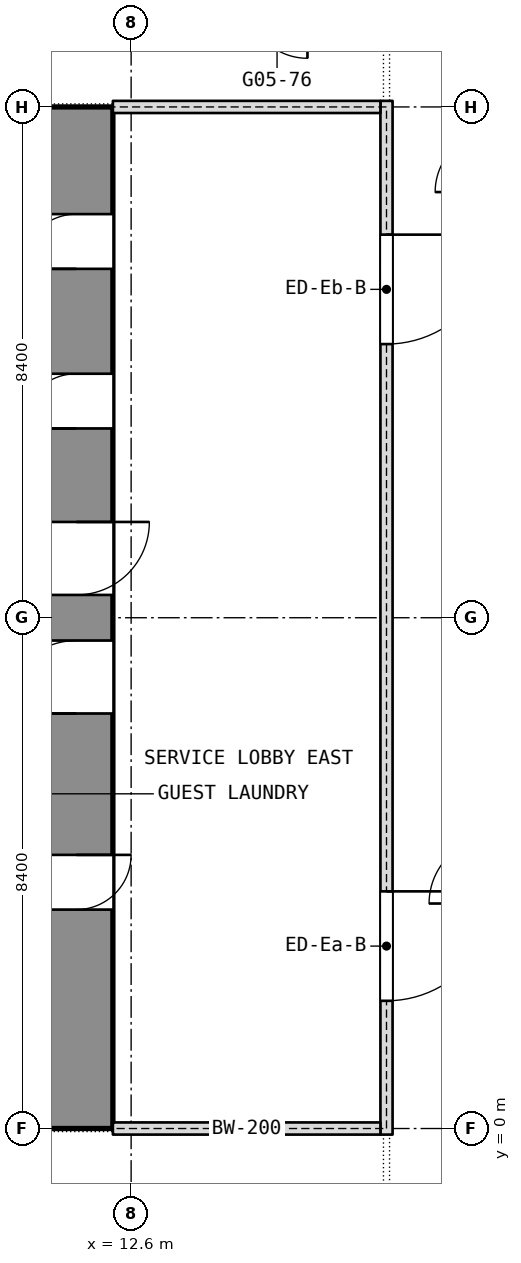
"""IFC4 building model, lengths in metres.
Left out: names, types, materials, properties, quantities, classifications, styles, units other than length and angle.
Written with IfcOpenShell. Run it as: python <this file> out.ifc"""

import sys

from ifc_helpers import new_model, si_unit, direction, frame, frame_2d, origin, place, context, subcontext, project, spatial, rectangle, extrude, element, fill, save


model = new_model("IFC4")
c1 = context("Model", 3, precision=1e-05, world=origin(), true_north=direction((0.0, 1.0)))
c2 = subcontext(c1, "Body", "Model", "MODEL_VIEW")
j1 = project(units=[si_unit("LENGTHUNIT", "METRE"), si_unit("PLANEANGLEUNIT", "RADIAN")], contexts=[c1])
p1 = place(None, origin())
s1 = spatial("IfcSite", under=j1, at=p1, CompositionType="ELEMENT")
p2 = place(p1, origin())
s2 = spatial("IfcBuilding", under=s1, at=p2, CompositionType="ELEMENT")
p3 = place(p2, frame((0.0, 0.0, 68.9)))
s3 = spatial("IfcBuildingStorey", under=s2, at=p3, CompositionType="ELEMENT", Elevation=68.9)
p4 = place(p3, frame((11.7, 0.0, 0.0), z_axis=(0.0, 0.0, 1.0), x_axis=(0.0, 1.0, 0.0)))
e1 = element("IfcWall", 1, at=p4, inside=s3, PredefinedType="SHEAR", context=c2, shape_type="SweptSolid", body=[
    extrude(rectangle(XDim=16.8, YDim=1.2, at=frame_2d((8.4, 0.0))), origin(), (0.0, 0.0, 1.0), 3.6),
])
p5 = place(p4, frame((3.6, 0.0, 0.0)))
e2 = element("IfcOpeningElement", 2, at=p5, cuts=e1, PredefinedType="OPENING", context=c2, shape_type="SweptSolid", body=[
    extrude(rectangle(XDim=0.9, YDim=2.1, at=frame_2d((0.45, 1.05))), frame((0.0, 0.6, 0.0), z_axis=(0.0, -1.0, 0.0), x_axis=(1.0, 0.0, 0.0)), (0.0, 0.0, 1.0), 1.2),
])
p6 = place(p4, frame((6.825, 0.0, 0.0)))
e3 = element("IfcOpeningElement", 3, at=p6, cuts=e1, PredefinedType="OPENING", context=c2, shape_type="SweptSolid", body=[
    extrude(rectangle(XDim=1.2, YDim=2.1, at=frame_2d((0.6, 1.05))), frame((0.0, 0.6, 0.0), z_axis=(0.0, -1.0, 0.0), x_axis=(1.0, 0.0, 0.0)), (0.0, 0.0, 1.0), 1.2),
])
p7 = place(p4, frame((14.137, 0.0, 0.0)))
e4 = element("IfcOpeningElement", 4, at=p7, cuts=e1, PredefinedType="OPENING", context=c2, shape_type="SweptSolid", body=[
    extrude(rectangle(XDim=0.9, YDim=2.1, at=frame_2d((0.45, 1.05))), frame((0.0, 0.6, 0.0), z_axis=(0.0, -1.0, 0.0), x_axis=(1.0, 0.0, 0.0)), (0.0, 0.0, 1.0), 1.2),
])
p8 = place(p4, frame((11.512, 0.0, 0.0)))
e5 = element("IfcOpeningElement", 5, at=p8, cuts=e1, PredefinedType="OPENING", context=c2, shape_type="SweptSolid", body=[
    extrude(rectangle(XDim=0.9, YDim=2.1, at=frame_2d((0.45, 1.05))), frame((0.0, 0.6, 0.0), z_axis=(0.0, -1.0, 0.0), x_axis=(1.0, 0.0, 0.0)), (0.0, 0.0, 1.0), 1.2),
])
p9 = place(p4, frame((8.775, 0.0, 0.0)))
e6 = element("IfcOpeningElement", 6, at=p9, cuts=e1, PredefinedType="OPENING", context=c2, shape_type="SweptSolid", body=[
    extrude(rectangle(XDim=1.2, YDim=2.1, at=frame_2d((0.6, 1.05))), frame((0.0, 0.6, 0.0), z_axis=(0.0, -1.0, 0.0), x_axis=(1.0, 0.0, 0.0)), (0.0, 0.0, 1.0), 1.2),
])
p10 = place(p3, frame((16.8, -0.1, 0.0), z_axis=(0.0, 0.0, 1.0), x_axis=(0.0, 1.0, 0.0)))
e7 = element("IfcWall", 7, at=p10, inside=s3, PredefinedType="PARTITIONING", context=c2, shape_type="SweptSolid", body=[
    extrude(rectangle(XDim=17.0, YDim=0.2, at=frame_2d((8.5, 0.0))), origin(), (0.0, 0.0, 1.0), 3.34),
])
p11 = place(p10, frame((2.2, 0.0, 0.0)))
e8 = element("IfcOpeningElement", 8, at=p11, cuts=e7, PredefinedType="OPENING", context=c2, shape_type="SweptSolid", body=[
    extrude(rectangle(XDim=1.8, YDim=2.1, at=frame_2d((0.9, 1.05))), frame((0.0, 0.1, 0.0), z_axis=(0.0, -1.0, 0.0), x_axis=(1.0, 0.0, 0.0)), (0.0, 0.0, 1.0), 0.2),
])
p12 = place(p10, frame((13.0, 0.0, 0.0)))
e9 = element("IfcOpeningElement", 9, at=p12, cuts=e7, PredefinedType="OPENING", context=c2, shape_type="SweptSolid", body=[
    extrude(rectangle(XDim=1.8, YDim=2.1, at=frame_2d((0.9, 1.05))), frame((0.0, 0.1, 0.0), z_axis=(0.0, -1.0, 0.0), x_axis=(1.0, 0.0, 0.0)), (0.0, 0.0, 1.0), 0.2),
])
for number, where, z_axis, x_axis in (
    (10, (12.3, 0.0, 0.0), (0.0, 0.0, 1.0), (1.0, 0.0, 0.0)),
    (11, (12.3, 16.8, 0.0), (0.0, 0.0, 1.0), (1.0, 0.0, 0.0)),
):
    element("IfcWall", number, at=place(p3, frame(where, z_axis=z_axis, x_axis=x_axis)), inside=s3, PredefinedType="PARTITIONING", context=c2, shape_type="SweptSolid", body=[
        extrude(rectangle(XDim=4.4, YDim=0.2, at=frame_2d((2.2, 0.0))), origin(), (0.0, 0.0, 1.0), 2.84),
    ])
p13 = place(p5, origin())
e12 = element("IfcDoor", 12, at=p13, inside=s3, OperationType="SINGLE_SWING_LEFT", PredefinedType="DOOR", context=c2, shape_type="SweptSolid", body=[
    extrude(rectangle(XDim=0.9, YDim=2.1, at=frame_2d((0.45, 1.05))), frame((0.0, 0.025, 0.0), z_axis=(0.0, -1.0, 0.0), x_axis=(1.0, 0.0, 0.0)), (0.0, 0.0, 1.0), 0.05),
])
fill(e2, e12)
p14 = place(p6, origin())
e13 = element("IfcDoor", 13, at=p14, inside=s3, OperationType="SINGLE_SWING_LEFT", PredefinedType="DOOR", context=c2, shape_type="SweptSolid", body=[
    extrude(rectangle(XDim=1.2, YDim=2.1, at=frame_2d((0.6, 1.05))), frame((0.0, 0.025, 0.0), z_axis=(0.0, -1.0, 0.0), x_axis=(1.0, 0.0, 0.0)), (0.0, 0.0, 1.0), 0.05),
])
fill(e3, e13)
p15 = place(p7, origin())
e14 = element("IfcDoor", 14, at=p15, inside=s3, OperationType="SINGLE_SWING_LEFT", PredefinedType="DOOR", context=c2, shape_type="SweptSolid", body=[
    extrude(rectangle(XDim=0.9, YDim=2.1, at=frame_2d((0.45, 1.05))), frame((0.0, 0.025, 0.0), z_axis=(0.0, -1.0, 0.0), x_axis=(1.0, 0.0, 0.0)), (0.0, 0.0, 1.0), 0.05),
])
fill(e4, e14)
p16 = place(p8, origin())
e15 = element("IfcDoor", 15, at=p16, inside=s3, OperationType="SINGLE_SWING_LEFT", PredefinedType="DOOR", context=c2, shape_type="SweptSolid", body=[
    extrude(rectangle(XDim=0.9, YDim=2.1, at=frame_2d((0.45, 1.05))), frame((0.0, 0.025, 0.0), z_axis=(0.0, -1.0, 0.0), x_axis=(1.0, 0.0, 0.0)), (0.0, 0.0, 1.0), 0.05),
])
fill(e5, e15)
p17 = place(p9, origin())
e16 = element("IfcDoor", 16, at=p17, inside=s3, OperationType="SINGLE_SWING_LEFT", PredefinedType="DOOR", context=c2, shape_type="SweptSolid", body=[
    extrude(rectangle(XDim=1.2, YDim=2.1, at=frame_2d((0.6, 1.05))), frame((0.0, 0.025, 0.0), z_axis=(0.0, -1.0, 0.0), x_axis=(1.0, 0.0, 0.0)), (0.0, 0.0, 1.0), 0.05),
])
fill(e6, e16)
p18 = place(p11, origin())
e17 = element("IfcDoor", 17, at=p18, inside=s3, OperationType="DOUBLE_DOOR_SINGLE_SWING", PredefinedType="DOOR", context=c2, shape_type="SweptSolid", body=[
    extrude(rectangle(XDim=1.8, YDim=2.1, at=frame_2d((0.9, 1.05))), frame((0.0, 0.025, 0.0), z_axis=(0.0, -1.0, 0.0), x_axis=(1.0, 0.0, 0.0)), (0.0, 0.0, 1.0), 0.05),
])
fill(e8, e17)
p19 = place(p12, origin())
e18 = element("IfcDoor", 18, at=p19, inside=s3, OperationType="DOUBLE_DOOR_SINGLE_SWING", PredefinedType="DOOR", context=c2, shape_type="SweptSolid", body=[
    extrude(rectangle(XDim=1.8, YDim=2.1, at=frame_2d((0.9, 1.05))), frame((0.0, 0.025, 0.0), z_axis=(0.0, -1.0, 0.0), x_axis=(1.0, 0.0, 0.0)), (0.0, 0.0, 1.0), 0.05),
])
fill(e9, e18)
save(model, sys.argv[1])
